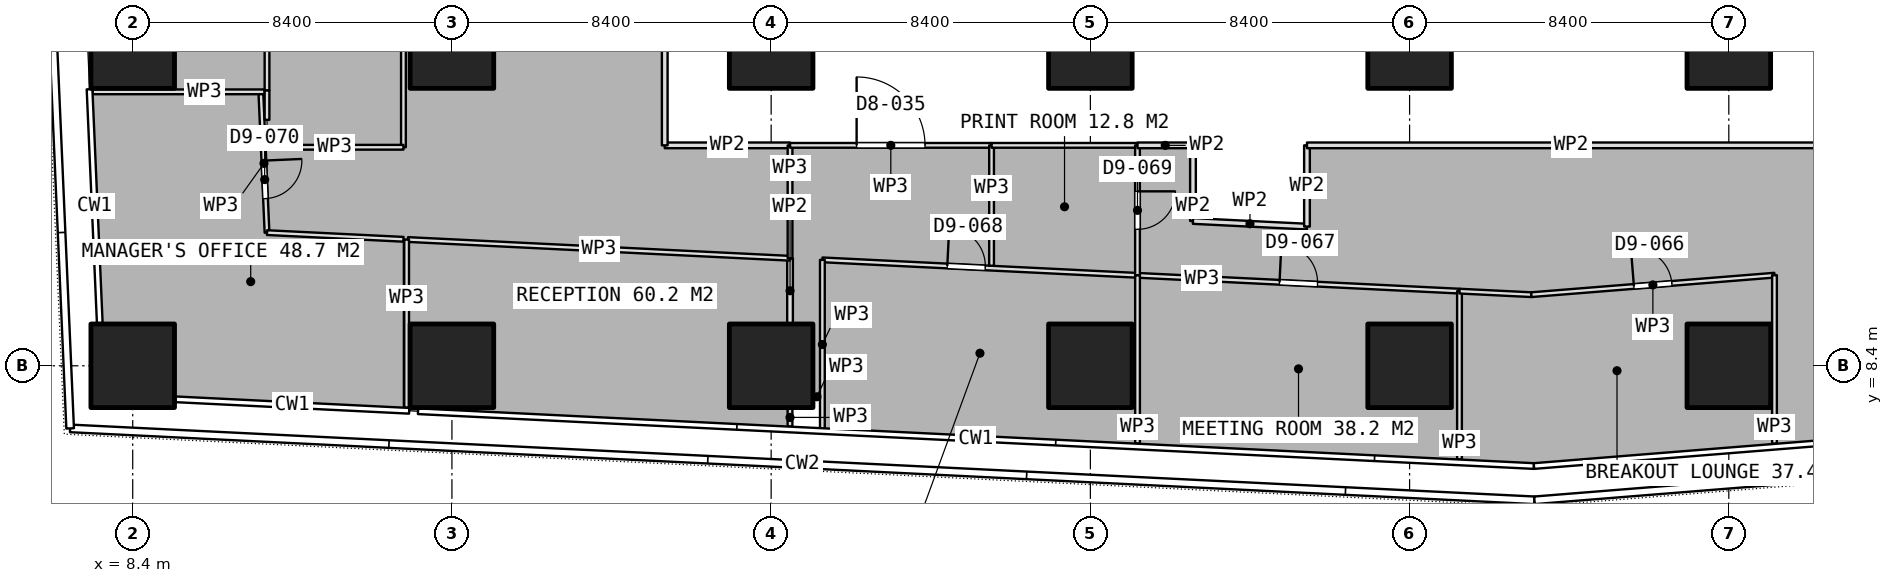
"""IFC4 building model, lengths in metres.
Left out: names, types, materials, properties, quantities, classifications, styles, units other than length and angle.
Written with IfcOpenShell. Run it as: python <this file> out.ifc"""

import sys

from ifc_helpers import new_model, si_unit, direction, frame, frame_2d, origin, origin_2d, place, context, subcontext, project, spatial, rectangle, extrude, element, fill, save


model = new_model("IFC4")
c1 = context("Model", 3, precision=1e-05, world=origin(), true_north=direction((0.0, 1.0)))
c2 = subcontext(c1, "Body", "Model", "MODEL_VIEW")
j1 = project(units=[si_unit("LENGTHUNIT", "METRE"), si_unit("PLANEANGLEUNIT", "RADIAN")], contexts=[c1])
p1 = place(None, origin())
s1 = spatial("IfcSite", under=j1, at=p1, CompositionType="ELEMENT")
p2 = place(p1, origin())
s2 = spatial("IfcBuilding", under=s1, at=p2, CompositionType="ELEMENT")
p3 = place(p2, frame((0.0, 0.0, 36.65)))
s3 = spatial("IfcBuildingStorey", under=s2, at=p3, CompositionType="ELEMENT", Elevation=36.65)
for number, where, z_axis, x_axis in (
    (1, (8.4, 8.4, 0.0), (0.0, 0.0, 1.0), (1.0, 0.0, 0.0)),
    (2, (8.4, 16.8, 0.0), (0.0, 0.0, 1.0), (1.0, 0.0, 0.0)),
    (3, (16.8, 8.4, 0.0), (0.0, 0.0, 1.0), (1.0, 0.0, 0.0)),
    (4, (16.8, 16.8, 0.0), (0.0, 0.0, 1.0), (1.0, 0.0, 0.0)),
    (5, (25.2, 8.4, 0.0), (0.0, 0.0, 1.0), (1.0, 0.0, 0.0)),
    (6, (25.2, 16.8, 0.0), (0.0, 0.0, 1.0), (1.0, 0.0, 0.0)),
    (7, (33.6, 8.4, 0.0), (0.0, 0.0, 1.0), (1.0, 0.0, 0.0)),
    (8, (33.6, 16.8, 0.0), (0.0, 0.0, 1.0), (1.0, 0.0, 0.0)),
    (9, (42.0, 8.4, 0.0), (0.0, 0.0, 1.0), (1.0, 0.0, 0.0)),
    (10, (42.0, 16.8, 0.0), (0.0, 0.0, 1.0), (1.0, 0.0, 0.0)),
    (11, (50.4, 8.4, 0.0), (0.0, 0.0, 1.0), (1.0, 0.0, 0.0)),
    (12, (50.4, 16.8, 0.0), (0.0, 0.0, 1.0), (1.0, 0.0, 0.0)),
):
    element("IfcColumn", number, at=place(p3, frame(where, z_axis=z_axis, x_axis=x_axis)), inside=s3, PredefinedType="COLUMN", context=c2, shape_type="SweptSolid", body=[
        extrude(rectangle(XDim=2.2, YDim=2.2, at=origin_2d()), origin(), (0.0, 0.0, 1.0), 3.75),
    ])
p4 = place(p3, frame((34.841, 10.78, 0.0), z_axis=(0.0, 0.0, 1.0), x_axis=(0.998796515078, -0.049046115723, 0.0)))
e13 = element("IfcWall", 13, at=p4, inside=s3, PredefinedType="PARTITIONING", context=c2, shape_type="SweptSolid", body=[
    extrude(rectangle(XDim=8.482, YDim=0.125, at=frame_2d((4.241, 0.0))), origin(), (0.0, 0.0, 1.0), 3.5),
])
p5 = place(p4, frame((3.741, 0.0, 0.0)))
e14 = element("IfcOpeningElement", 14, at=p5, cuts=e13, PredefinedType="OPENING", context=c2, shape_type="SweptSolid", body=[
    extrude(rectangle(XDim=1.0, YDim=2.1, at=frame_2d((0.5, 1.05))), frame((0.0, 0.073, 0.0), z_axis=(0.0, -1.0, 0.0), x_axis=(1.0, 0.0, 0.0)), (0.0, 0.0, 1.0), 0.145),
])
for number, where, z_axis, x_axis in (
    (15, (43.313, 10.364, 0.0), (0.0, 0.0, 1.0), (0.0, -1.0, 0.0)),
    (16, (34.841, 6.354, 0.0), (0.0, 0.0, 1.0), (0.0, 1.0, 0.0)),
):
    element("IfcWall", number, at=place(p3, frame(where, z_axis=z_axis, x_axis=x_axis)), inside=s3, PredefinedType="PARTITIONING", context=c2, shape_type="SweptSolid", body=[
        extrude(rectangle(XDim=4.426, YDim=0.125, at=frame_2d((2.213, 0.0))), origin(), (0.0, 0.0, 1.0), 3.5),
    ])
p6 = place(p3, frame((43.314, 10.364, 0.0), z_axis=(0.0, 0.0, 1.0), x_axis=(0.998788470102, -0.04920967375, 0.0)))
e17 = element("IfcWall", 17, at=p6, inside=s3, PredefinedType="PARTITIONING", context=c2, shape_type="SweptSolid", body=[
    extrude(rectangle(XDim=1.89, YDim=0.125, at=frame_2d((0.945, 0.0))), origin(), (0.0, 0.0, 1.0), 3.5),
])
p7 = place(p3, frame((45.202, 10.271, 0.0), z_axis=(0.0, 0.0, 1.0), x_axis=(0.996803782356, 0.079888794459, 0.0)))
e18 = element("IfcWall", 18, at=p7, inside=s3, PredefinedType="PARTITIONING", context=c2, shape_type="SweptSolid", body=[
    extrude(rectangle(XDim=6.421, YDim=0.125, at=frame_2d((3.21, 0.0))), origin(), (0.0, 0.0, 1.0), 3.5),
])
p8 = place(p7, frame((2.71, 0.0, 0.0)))
e19 = element("IfcOpeningElement", 19, at=p8, cuts=e18, PredefinedType="OPENING", context=c2, shape_type="SweptSolid", body=[
    extrude(rectangle(XDim=1.0, YDim=2.1, at=frame_2d((0.5, 1.05))), frame((0.0, 0.073, 0.0), z_axis=(0.0, -1.0, 0.0), x_axis=(1.0, 0.0, 0.0)), (0.0, 0.0, 1.0), 0.145),
])
p9 = place(p3, frame((51.602, 10.784, 0.0), z_axis=(0.0, 0.0, 1.0), x_axis=(0.0, -1.0, 0.0)))
e20 = element("IfcWall", 20, at=p9, inside=s3, PredefinedType="PARTITIONING", context=c2, shape_type="SweptSolid", body=[
    extrude(rectangle(XDim=4.435, YDim=0.125, at=frame_2d((2.217, 0.0))), origin(), (0.0, 0.0, 1.0), 3.5),
])
p10 = place(p3, frame((26.548, 11.187, 0.0), z_axis=(0.0, 0.0, 1.0), x_axis=(0.998797680893, -0.049022368804, 0.0)))
e21 = element("IfcWall", 21, at=p10, inside=s3, PredefinedType="PARTITIONING", context=c2, shape_type="SweptSolid", body=[
    extrude(rectangle(XDim=8.302, YDim=0.125, at=frame_2d((4.151, 0.0))), origin(), (0.0, 0.0, 1.0), 3.5),
])
p11 = place(p10, frame((3.291, 0.0, 0.0)))
e22 = element("IfcOpeningElement", 22, at=p11, cuts=e21, PredefinedType="OPENING", context=c2, shape_type="SweptSolid", body=[
    extrude(rectangle(XDim=1.0, YDim=2.1, at=frame_2d((0.5, 1.05))), frame((0.0, 0.073, 0.0), z_axis=(0.0, -1.0, 0.0), x_axis=(1.0, 0.0, 0.0)), (0.0, 0.0, 1.0), 0.145),
])
p12 = place(p3, frame((26.548, 6.732, 0.0), z_axis=(0.0, 0.0, 1.0), x_axis=(0.0, 1.0, 0.0)))
e23 = element("IfcWall", 23, at=p12, inside=s3, PredefinedType="PARTITIONING", context=c2, shape_type="SweptSolid", body=[
    extrude(rectangle(XDim=4.455, YDim=0.125, at=frame_2d((2.228, 0.0))), origin(), (0.0, 0.0, 1.0), 3.5),
])
p13 = place(p3, frame((15.643, 11.722, 0.0), z_axis=(0.0, 0.0, 1.0), x_axis=(0.998800316201, -0.048968646667, 0.0)))
e24 = element("IfcWall", 24, at=p13, inside=s3, PredefinedType="PARTITIONING", context=c2, shape_type="SweptSolid", body=[
    extrude(rectangle(XDim=10.066, YDim=0.125, at=frame_2d((5.033, 0.0))), origin(), (0.0, 0.0, 1.0), 3.5),
])
p14 = place(p3, frame((25.697, 11.229, 0.0), z_axis=(0.0, 0.0, 1.0), x_axis=(0.0, 1.0, 0.0)))
e25 = element("IfcWall", 25, at=p14, inside=s3, PredefinedType="PARTITIONING", context=c2, shape_type="SweptSolid", body=[
    extrude(rectangle(XDim=2.971, YDim=0.125, at=frame_2d((1.485, 0.0))), origin(), (0.0, 0.0, 1.0), 3.5),
])
p15 = place(p3, frame((25.697, 14.2, 0.0), z_axis=(0.0, 0.0, 1.0), x_axis=(1.0, 0.0, 0.0)))
e26 = element("IfcWall", 26, at=p15, inside=s3, PredefinedType="PARTITIONING", context=c2, shape_type="SweptSolid", body=[
    extrude(rectangle(XDim=5.303, YDim=0.125, at=frame_2d((2.651, 0.0))), origin(), (0.0, 0.0, 1.0), 3.5),
])
p16 = place(p15, frame((1.752, 0.0, 0.0)))
e27 = element("IfcOpeningElement", 27, at=p16, cuts=e26, PredefinedType="OPENING", context=c2, shape_type="SweptSolid", body=[
    extrude(rectangle(XDim=1.8, YDim=2.1, at=frame_2d((0.9, 1.05))), frame((0.0, 0.073, 0.0), z_axis=(0.0, -1.0, 0.0), x_axis=(1.0, 0.0, 0.0)), (0.0, 0.0, 1.0), 0.145),
])
p17 = place(p3, frame((31.0, 14.2, 0.0), z_axis=(0.0, 0.0, 1.0), x_axis=(0.0, -1.0, 0.0)))
e28 = element("IfcWall", 28, at=p17, inside=s3, PredefinedType="PARTITIONING", context=c2, shape_type="SweptSolid", body=[
    extrude(rectangle(XDim=3.169, YDim=0.125, at=frame_2d((1.584, 0.0))), origin(), (0.0, 0.0, 1.0), 3.5),
])
p18 = place(p3, frame((26.485, 7.584, 0.0), z_axis=(0.0, 0.0, 1.0), x_axis=(-1.0, 0.0, 0.0)))
e29 = element("IfcWall", 29, at=p18, inside=s3, PredefinedType="PARTITIONING", context=c2, shape_type="SweptSolid", body=[
    extrude(rectangle(XDim=0.165, YDim=0.125, at=frame_2d((0.083, 0.0))), origin(), (0.0, 0.0, 1.0), 3.5),
])
p19 = place(p3, frame((25.696, 7.28, 0.0), z_axis=(0.0, 0.0, 1.0), x_axis=(0.0, -1.0, 0.0)))
e30 = element("IfcWall", 30, at=p19, inside=s3, PredefinedType="PARTITIONING", context=c2, shape_type="SweptSolid", body=[
    extrude(rectangle(XDim=0.477, YDim=0.125, at=frame_2d((0.239, 0.0))), origin(), (0.0, 0.0, 1.0), 3.5),
])
p20 = place(p3, frame((15.608, 7.299, 0.0), z_axis=(0.0, 0.0, 1.0), x_axis=(0.0, 1.0, 0.0)))
e31 = element("IfcWall", 31, at=p20, inside=s3, PredefinedType="PARTITIONING", context=c2, shape_type="SweptSolid", body=[
    extrude(rectangle(XDim=4.423, YDim=0.125, at=frame_2d((2.211, 0.0))), origin(), (0.0, 0.0, 1.0), 3.5),
])
p21 = place(p3, frame((31.0, 14.2, 0.0), z_axis=(0.0, 0.0, 1.0), x_axis=(1.0, 0.0, 0.0)))
e32 = element("IfcWall", 32, at=p21, inside=s3, PredefinedType="PARTITIONING", context=c2, shape_type="SweptSolid", body=[
    extrude(rectangle(XDim=3.84, YDim=0.125, at=frame_2d((1.92, 0.0))), origin(), (0.0, 0.0, 1.0), 3.5),
])
p22 = place(p3, frame((34.84, 14.2, 0.0), z_axis=(0.0, 0.0, 1.0), x_axis=(0.0, -1.0, 0.0)))
e33 = element("IfcWall", 33, at=p22, inside=s3, PredefinedType="PARTITIONING", context=c2, shape_type="SweptSolid", body=[
    extrude(rectangle(XDim=3.42, YDim=0.125, at=frame_2d((1.71, 0.0))), origin(), (0.0, 0.0, 1.0), 3.5),
])
p23 = place(p22, frame((1.21, 0.0, 0.0)))
e34 = element("IfcOpeningElement", 34, at=p23, cuts=e33, PredefinedType="OPENING", context=c2, shape_type="SweptSolid", body=[
    extrude(rectangle(XDim=1.0, YDim=2.1, at=frame_2d((0.5, 1.05))), frame((0.0, 0.073, 0.0), z_axis=(0.0, -1.0, 0.0), x_axis=(1.0, 0.0, 0.0)), (0.0, 0.0, 1.0), 0.145),
])
p24 = place(p3, frame((34.84, 14.2, 0.0), z_axis=(0.0, 0.0, 1.0), x_axis=(1.0, 0.0, 0.0)))
e35 = element("IfcWall", 35, at=p24, inside=s3, PredefinedType="PARTITIONING", context=c2, shape_type="SweptSolid", body=[
    extrude(rectangle(XDim=1.46, YDim=0.15, at=frame_2d((0.73, 0.0))), origin(), (0.0, 0.0, 1.0), 3.5),
])
p25 = place(p3, frame((36.3, 14.2, 0.0), z_axis=(0.0, 0.0, 1.0), x_axis=(0.0, -1.0, 0.0)))
e36 = element("IfcWall", 36, at=p25, inside=s3, PredefinedType="PARTITIONING", context=c2, shape_type="SweptSolid", body=[
    extrude(rectangle(XDim=1.99, YDim=0.15, at=frame_2d((0.995, 0.0))), origin(), (0.0, 0.0, 1.0), 3.5),
])
p26 = place(p3, frame((36.3, 12.21, 0.0), z_axis=(0.0, 0.0, 1.0), x_axis=(0.998786159732, -0.04925654401, 0.0)))
e37 = element("IfcWall", 37, at=p26, inside=s3, PredefinedType="PARTITIONING", context=c2, shape_type="SweptSolid", body=[
    extrude(rectangle(XDim=3.004, YDim=0.15, at=frame_2d((1.502, 0.0))), origin(), (0.0, 0.0, 1.0), 3.5),
])
p27 = place(p3, frame((39.3, 12.062, 0.0), z_axis=(0.0, 0.0, 1.0), x_axis=(0.0, 1.0, 0.0)))
e38 = element("IfcWall", 38, at=p27, inside=s3, PredefinedType="PARTITIONING", context=c2, shape_type="SweptSolid", body=[
    extrude(rectangle(XDim=2.138, YDim=0.15, at=frame_2d((1.069, 0.0))), origin(), (0.0, 0.0, 1.0), 3.5),
])
p28 = place(p3, frame((39.3, 14.2, 0.0), z_axis=(0.0, 0.0, 1.0), x_axis=(1.0, 0.0, 0.0)))
e39 = element("IfcWall", 39, at=p28, inside=s3, PredefinedType="PARTITIONING", context=c2, shape_type="SweptSolid", body=[
    extrude(rectangle(XDim=13.9, YDim=0.15, at=frame_2d((6.95, 0.0))), origin(), (0.0, 0.0, 1.0), 3.5),
])
p29 = place(p3, frame((11.934, 28.2, 0.0), z_axis=(0.0, 0.0, 1.0), x_axis=(0.0, -1.0, 0.0)))
e40 = element("IfcWall", 40, at=p29, inside=s3, PredefinedType="PARTITIONING", context=c2, shape_type="SweptSolid", body=[
    extrude(rectangle(XDim=12.557, YDim=0.125, at=frame_2d((6.278, 0.0))), origin(), (0.0, 0.0, 1.0), 3.5),
])
p30 = place(p3, frame((11.871, 15.608, 0.0), z_axis=(0.0, 0.0, 1.0), x_axis=(-1.0, 0.0, 0.0)))
e41 = element("IfcWall", 41, at=p30, inside=s3, PredefinedType="PARTITIONING", context=c2, shape_type="SweptSolid", body=[
    extrude(rectangle(XDim=4.524, YDim=0.125, at=frame_2d((2.262, 0.0))), origin(), (0.0, 0.0, 1.0), 3.5),
])
p31 = place(p3, frame((11.774, 15.546, 0.0), z_axis=(0.0, 0.0, 1.0), x_axis=(0.043934208205, -0.999034426509, 0.0)))
e42 = element("IfcWall", 42, at=p31, inside=s3, PredefinedType="PARTITIONING", context=c2, shape_type="SweptSolid", body=[
    extrude(rectangle(XDim=3.645, YDim=0.125, at=frame_2d((1.823, 0.0))), origin(), (0.0, 0.0, 1.0), 3.5),
])
p32 = place(p31, frame((1.749, 0.0, 0.0)))
e43 = element("IfcOpeningElement", 43, at=p32, cuts=e42, PredefinedType="OPENING", context=c2, shape_type="SweptSolid", body=[
    extrude(rectangle(XDim=1.0, YDim=2.1, at=frame_2d((0.5, 1.05))), frame((0.0, 0.073, 0.0), z_axis=(0.0, -1.0, 0.0), x_axis=(1.0, 0.0, 0.0)), (0.0, 0.0, 1.0), 0.145),
])
p33 = place(p3, frame((11.934, 11.904, 0.0), z_axis=(0.0, 0.0, 1.0), x_axis=(0.998799983391, -0.048975434441, 0.0)))
e44 = element("IfcWall", 44, at=p33, inside=s3, PredefinedType="PARTITIONING", context=c2, shape_type="SweptSolid", body=[
    extrude(rectangle(XDim=3.594, YDim=0.125, at=frame_2d((1.797, 0.0))), origin(), (0.0, 0.0, 1.0), 3.5),
])
p34 = place(p3, frame((15.524, 28.2, 0.0), z_axis=(0.0, 0.0, 1.0), x_axis=(0.0, -1.0, 0.0)))
e45 = element("IfcWall", 45, at=p34, inside=s3, PredefinedType="PARTITIONING", context=c2, shape_type="SweptSolid", body=[
    extrude(rectangle(XDim=14.05, YDim=0.125, at=frame_2d((7.025, 0.0))), origin(), (0.0, 0.0, 1.0), 3.5),
])
p35 = place(p34, frame((6.125, 0.0, 0.0)))
e46 = element("IfcOpeningElement", 46, at=p35, cuts=e45, PredefinedType="OPENING", context=c2, shape_type="SweptSolid", body=[
    extrude(rectangle(XDim=1.8, YDim=2.1, at=frame_2d((0.9, 1.05))), frame((0.0, 0.073, 0.0), z_axis=(0.0, -1.0, 0.0), x_axis=(1.0, 0.0, 0.0)), (0.0, 0.0, 1.0), 0.145),
])
p36 = place(p3, frame((15.524, 14.15, 0.0), z_axis=(0.0, 0.0, 1.0), x_axis=(-1.0, 0.0, 0.0)))
e47 = element("IfcWall", 47, at=p36, inside=s3, PredefinedType="PARTITIONING", context=c2, shape_type="SweptSolid", body=[
    extrude(rectangle(XDim=3.626, YDim=0.125, at=frame_2d((1.813, 0.0))), origin(), (0.0, 0.0, 1.0), 3.5),
])
p37 = place(p3, frame((11.934, 14.871, 0.0), z_axis=(0.0, 0.0, 1.0), x_axis=(0.0, 1.0, 0.0)))
e48 = element("IfcWall", 48, at=p37, inside=s3, PredefinedType="PARTITIONING", context=c2, shape_type="SweptSolid", body=[
    extrude(rectangle(XDim=0.772, YDim=0.125, at=frame_2d((0.386, 0.0))), origin(), (0.0, 0.0, 1.0), 3.5),
])
p38 = place(p3, frame((22.4, 28.2, 0.0), z_axis=(0.0, 0.0, 1.0), x_axis=(0.0, -1.0, 0.0)))
e49 = element("IfcWall", 49, at=p38, inside=s3, PredefinedType="PARTITIONING", context=c2, shape_type="SweptSolid", body=[
    extrude(rectangle(XDim=14.0, YDim=0.15, at=frame_2d((7.0, 0.0))), origin(), (0.0, 0.0, 1.0), 3.5),
])
p39 = place(p38, frame((6.5, 0.0, 0.0)))
e50 = element("IfcOpeningElement", 50, at=p39, cuts=e49, PredefinedType="OPENING", context=c2, shape_type="SweptSolid", body=[
    extrude(rectangle(XDim=1.0, YDim=2.1, at=frame_2d((0.5, 1.05))), frame((0.0, 0.085, 0.0), z_axis=(0.0, -1.0, 0.0), x_axis=(1.0, 0.0, 0.0)), (0.0, 0.0, 1.0), 0.17),
])
p40 = place(p3, frame((22.4, 14.2, 0.0), z_axis=(0.0, 0.0, 1.0), x_axis=(1.0, 0.0, 0.0)))
e51 = element("IfcWall", 51, at=p40, inside=s3, PredefinedType="PARTITIONING", context=c2, shape_type="SweptSolid", body=[
    extrude(rectangle(XDim=3.297, YDim=0.15, at=frame_2d((1.648, 0.0))), origin(), (0.0, 0.0, 1.0), 3.5),
])
p41 = place(p3, frame((25.697, 11.229, 0.0), z_axis=(0.0, 0.0, 1.0), x_axis=(0.0, -1.0, 0.0)))
e52 = element("IfcWall", 52, at=p41, inside=s3, PredefinedType="PARTITIONING", context=c2, shape_type="SweptSolid", body=[
    extrude(rectangle(XDim=1.709, YDim=0.15, at=frame_2d((0.854, 0.0))), origin(), (0.0, 0.0, 1.0), 3.5),
])
p42 = place(p5, origin())
e53 = element("IfcDoor", 53, at=p42, inside=s3, OperationType="SINGLE_SWING_LEFT", PredefinedType="DOOR", context=c2, shape_type="SweptSolid", body=[
    extrude(rectangle(XDim=1.0, YDim=2.1, at=frame_2d((0.5, 1.05))), frame((0.0, 0.025, 0.0), z_axis=(0.0, -1.0, 0.0), x_axis=(1.0, 0.0, 0.0)), (0.0, 0.0, 1.0), 0.05),
])
fill(e14, e53)
p43 = place(p8, origin())
e54 = element("IfcDoor", 54, at=p43, inside=s3, OperationType="SINGLE_SWING_LEFT", PredefinedType="DOOR", context=c2, shape_type="SweptSolid", body=[
    extrude(rectangle(XDim=1.0, YDim=2.1, at=frame_2d((0.5, 1.05))), frame((0.0, 0.025, 0.0), z_axis=(0.0, -1.0, 0.0), x_axis=(1.0, 0.0, 0.0)), (0.0, 0.0, 1.0), 0.05),
])
fill(e19, e54)
p44 = place(p16, origin())
e55 = element("IfcDoor", 55, at=p44, inside=s3, OperationType="DOUBLE_DOOR_SINGLE_SWING", PredefinedType="DOOR", context=c2, shape_type="SweptSolid", body=[
    extrude(rectangle(XDim=1.8, YDim=2.1, at=frame_2d((0.9, 1.05))), frame((0.0, 0.025, 0.0), z_axis=(0.0, -1.0, 0.0), x_axis=(1.0, 0.0, 0.0)), (0.0, 0.0, 1.0), 0.05),
])
fill(e27, e55)
p45 = place(p23, origin())
e56 = element("IfcDoor", 56, at=p45, inside=s3, OperationType="SINGLE_SWING_LEFT", PredefinedType="DOOR", context=c2, shape_type="SweptSolid", body=[
    extrude(rectangle(XDim=1.0, YDim=2.1, at=frame_2d((0.5, 1.05))), frame((0.0, 0.025, 0.0), z_axis=(0.0, -1.0, 0.0), x_axis=(1.0, 0.0, 0.0)), (0.0, 0.0, 1.0), 0.05),
])
fill(e34, e56)
p46 = place(p32, origin())
e57 = element("IfcDoor", 57, at=p46, inside=s3, OperationType="SINGLE_SWING_LEFT", PredefinedType="DOOR", context=c2, shape_type="SweptSolid", body=[
    extrude(rectangle(XDim=1.0, YDim=2.1, at=frame_2d((0.5, 1.05))), frame((0.0, 0.025, 0.0), z_axis=(0.0, -1.0, 0.0), x_axis=(1.0, 0.0, 0.0)), (0.0, 0.0, 1.0), 0.05),
])
fill(e43, e57)
p47 = place(p11, origin())
e58 = element("IfcDoor", 58, at=p47, inside=s3, OperationType="SINGLE_SWING_LEFT", PredefinedType="DOOR", context=c2, shape_type="SweptSolid", body=[
    extrude(rectangle(XDim=1.0, YDim=2.1, at=frame_2d((0.5, 1.05))), frame((0.0, 0.025, 0.0), z_axis=(0.0, -1.0, 0.0), x_axis=(1.0, 0.0, 0.0)), (0.0, 0.0, 1.0), 0.05),
])
fill(e22, e58)
save(model, sys.argv[1])
